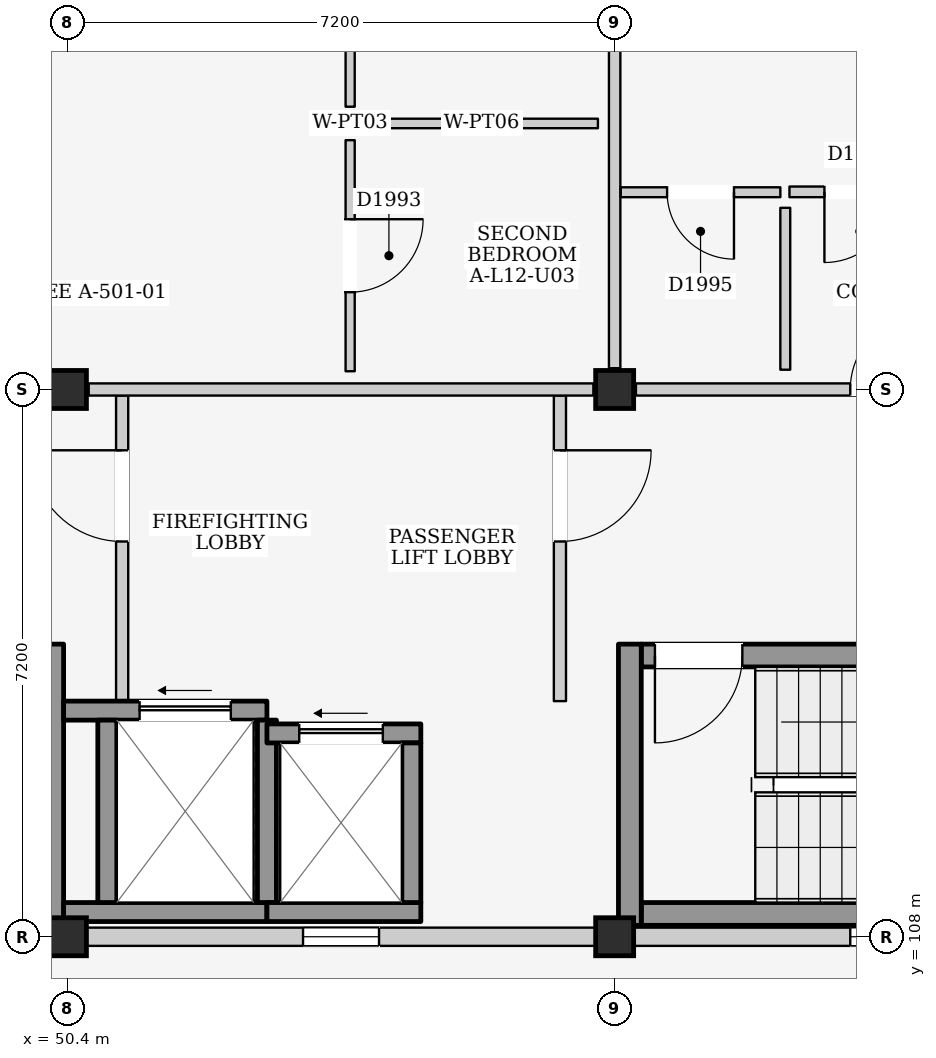
"""IFC4 building model, lengths in metres.
Left out: names, types, materials, properties, quantities, classifications, styles, units other than length and angle.
Written with IfcOpenShell. Run it as: python <this file> out.ifc"""

import sys

from ifc_helpers import new_model, si_unit, direction, frame, frame_2d, origin, origin_2d, place, context, subcontext, project, spatial, rectangle, extrude, element, fill, save


model = new_model("IFC4")
c1 = context("Model", 3, precision=1e-05, world=origin(), true_north=direction((0.0, 1.0)))
c2 = subcontext(c1, "Body", "Model", "MODEL_VIEW")
j1 = project(units=[si_unit("LENGTHUNIT", "METRE"), si_unit("PLANEANGLEUNIT", "RADIAN")], contexts=[c1])
p1 = place(None, origin())
s1 = spatial("IfcSite", under=j1, at=p1, CompositionType="ELEMENT")
p2 = place(p1, origin())
s2 = spatial("IfcBuilding", under=s1, at=p2, CompositionType="ELEMENT")
p3 = place(p2, frame((0.0, 0.0, 41.2)))
s3 = spatial("IfcBuildingStorey", under=s2, at=p3, CompositionType="ELEMENT", Elevation=41.2)
for number, where, z_axis, x_axis in (
    (1, (50.4, 108.0, 0.0), (0.0, 0.0, 1.0), (1.0, 0.0, 0.0)),
    (2, (50.4, 115.2, 0.0), (0.0, 0.0, 1.0), (1.0, 0.0, 0.0)),
    (3, (57.6, 108.0, 0.0), (0.0, 0.0, 1.0), (1.0, 0.0, 0.0)),
    (4, (57.6, 115.2, 0.0), (0.0, 0.0, 1.0), (1.0, 0.0, 0.0)),
):
    element("IfcColumn", number, at=place(p3, frame(where, z_axis=z_axis, x_axis=x_axis)), inside=s3, PredefinedType="COLUMN", context=c2, shape_type="SweptSolid", body=[
        extrude(rectangle(XDim=0.5, YDim=0.5, at=origin_2d()), origin(), (0.0, 0.0, 1.0), 3.2),
    ])
p4 = place(p3, frame((50.65, 108.0, 0.0), z_axis=(0.0, 0.0, 1.0), x_axis=(1.0, 0.0, 0.0)))
e5 = element("IfcWall", 5, at=p4, inside=s3, PredefinedType="ELEMENTEDWALL", context=c2, shape_type="SweptSolid", body=[
    extrude(rectangle(XDim=6.7, YDim=0.24, at=frame_2d((3.35, 0.0))), origin(), (0.0, 0.0, 1.0), 2.285),
])
p5 = place(p4, frame((2.85, 0.0, 1.2)))
e6 = element("IfcOpeningElement", 6, at=p5, cuts=e5, PredefinedType="OPENING", context=c2, shape_type="SweptSolid", body=[
    extrude(rectangle(XDim=1.0, YDim=0.9, at=frame_2d((0.5, 0.45))), frame((0.0, 0.135, 0.0), z_axis=(0.0, -1.0, 0.0), x_axis=(1.0, 0.0, 0.0)), (0.0, 0.0, 1.0), 0.27),
])
p6 = place(p3, frame((57.85, 108.0, 0.0), z_axis=(0.0, 0.0, 1.0), x_axis=(1.0, 0.0, 0.0)))
e7 = element("IfcWall", 7, at=p6, inside=s3, PredefinedType="ELEMENTEDWALL", context=c2, shape_type="SweptSolid", body=[
    extrude(rectangle(XDim=6.7, YDim=0.24, at=frame_2d((3.35, 0.0))), origin(), (0.0, 0.0, 1.0), 2.285),
])
p7 = place(p6, frame((2.85, 0.0, 1.2)))
e8 = element("IfcOpeningElement", 8, at=p7, cuts=e7, PredefinedType="OPENING", context=c2, shape_type="SweptSolid", body=[
    extrude(rectangle(XDim=1.0, YDim=0.9, at=frame_2d((0.5, 0.45))), frame((0.0, 0.135, 0.0), z_axis=(0.0, -1.0, 0.0), x_axis=(1.0, 0.0, 0.0)), (0.0, 0.0, 1.0), 0.27),
])
p8 = place(p3, frame((50.2, 108.15, 0.0), z_axis=(0.0, 0.0, 1.0), x_axis=(0.0, 1.0, 0.0)))
e9 = element("IfcWall", 9, at=p8, inside=s3, PredefinedType="SHEAR", context=c2, shape_type="SweptSolid", body=[
    extrude(rectangle(XDim=3.7, YDim=0.3, at=frame_2d((1.85, 0.0))), origin(), (0.0, 0.0, 1.0), 2.95),
])
p9 = place(p3, frame((51.12, 111.1, 0.0), z_axis=(0.0, 0.0, 1.0), x_axis=(0.0, 1.0, 0.0)))
e10 = element("IfcWall", 10, at=p9, inside=s3, PredefinedType="PARTITIONING", context=c2, shape_type="SweptSolid", body=[
    extrude(rectangle(XDim=4.02, YDim=0.16, at=frame_2d((2.01, 0.0))), origin(), (0.0, 0.0, 1.0), 2.95),
])
p10 = place(p9, frame((2.1, 0.0, 0.0)))
e11 = element("IfcOpeningElement", 11, at=p10, cuts=e10, PredefinedType="OPENING", context=c2, shape_type="SweptSolid", body=[
    extrude(rectangle(XDim=1.2, YDim=2.2, at=frame_2d((0.6, 1.1))), frame((0.0, 0.095, 0.0), z_axis=(0.0, -1.0, 0.0), x_axis=(1.0, 0.0, 0.0)), (0.0, 0.0, 1.0), 0.19),
])
p11 = place(p3, frame((56.88, 111.1, 0.0), z_axis=(0.0, 0.0, 1.0), x_axis=(0.0, 1.0, 0.0)))
e12 = element("IfcWall", 12, at=p11, inside=s3, PredefinedType="PARTITIONING", context=c2, shape_type="SweptSolid", body=[
    extrude(rectangle(XDim=4.02, YDim=0.16, at=frame_2d((2.01, 0.0))), origin(), (0.0, 0.0, 1.0), 2.95),
])
p12 = place(p11, frame((2.1, 0.0, 0.0)))
e13 = element("IfcOpeningElement", 13, at=p12, cuts=e12, PredefinedType="OPENING", context=c2, shape_type="SweptSolid", body=[
    extrude(rectangle(XDim=1.2, YDim=2.2, at=frame_2d((0.6, 1.1))), frame((0.0, 0.095, 0.0), z_axis=(0.0, -1.0, 0.0), x_axis=(1.0, 0.0, 0.0)), (0.0, 0.0, 1.0), 0.19),
])
p13 = place(p3, frame((50.35, 108.325, 0.0), z_axis=(0.0, 0.0, 1.0), x_axis=(1.0, 0.0, 0.0)))
e14 = element("IfcWall", 14, at=p13, inside=s3, PredefinedType="SHEAR", context=c2, shape_type="SweptSolid", body=[
    extrude(rectangle(XDim=2.675, YDim=0.25, at=frame_2d((1.337, 0.0))), origin(), (0.0, 0.0, 1.0), 2.95),
])
p14 = place(p3, frame((50.35, 110.975, 0.0), z_axis=(0.0, 0.0, 1.0), x_axis=(1.0, 0.0, 0.0)))
e15 = element("IfcWall", 15, at=p14, inside=s3, PredefinedType="SHEAR", context=c2, shape_type="SweptSolid", body=[
    extrude(rectangle(XDim=2.675, YDim=0.25, at=frame_2d((1.337, 0.0))), origin(), (0.0, 0.0, 1.0), 2.95),
])
p15 = place(p14, frame((1.0, 0.0, 0.0)))
e16 = element("IfcOpeningElement", 16, at=p15, cuts=e15, PredefinedType="OPENING", context=c2, shape_type="SweptSolid", body=[
    extrude(rectangle(XDim=1.2, YDim=2.25, at=frame_2d((0.6, 1.125))), frame((0.0, 0.14, 0.0), z_axis=(0.0, -1.0, 0.0), x_axis=(1.0, 0.0, 0.0)), (0.0, 0.0, 1.0), 0.28),
])
for number, where, z_axis, x_axis in (
    (17, (50.925, 108.45, 0.0), (0.0, 0.0, 1.0), (0.0, 1.0, 0.0)),
    (18, (53.025, 108.45, 0.0), (0.0, 0.0, 1.0), (0.0, 1.0, 0.0)),
):
    element("IfcWall", number, at=place(p3, frame(where, z_axis=z_axis, x_axis=x_axis)), inside=s3, PredefinedType="SHEAR", context=c2, shape_type="SweptSolid", body=[
        extrude(rectangle(XDim=2.4, YDim=0.25, at=frame_2d((1.2, 0.0))), origin(), (0.0, 0.0, 1.0), 2.95),
    ])
p16 = place(p3, frame((53.025, 108.325, 0.0), z_axis=(0.0, 0.0, 1.0), x_axis=(1.0, 0.0, 0.0)))
e19 = element("IfcWall", 19, at=p16, inside=s3, PredefinedType="SHEAR", context=c2, shape_type="SweptSolid", body=[
    extrude(rectangle(XDim=2.025, YDim=0.25, at=frame_2d((1.013, 0.0))), origin(), (0.0, 0.0, 1.0), 2.95),
])
p17 = place(p3, frame((53.025, 110.675, 0.0), z_axis=(0.0, 0.0, 1.0), x_axis=(1.0, 0.0, 0.0)))
e20 = element("IfcWall", 20, at=p17, inside=s3, PredefinedType="SHEAR", context=c2, shape_type="SweptSolid", body=[
    extrude(rectangle(XDim=2.025, YDim=0.25, at=frame_2d((1.013, 0.0))), origin(), (0.0, 0.0, 1.0), 2.95),
])
p18 = place(p17, frame((0.425, 0.0, 0.0)))
e21 = element("IfcOpeningElement", 21, at=p18, cuts=e20, PredefinedType="OPENING", context=c2, shape_type="SweptSolid", body=[
    extrude(rectangle(XDim=1.1, YDim=2.15, at=frame_2d((0.55, 1.075))), frame((0.0, 0.14, 0.0), z_axis=(0.0, -1.0, 0.0), x_axis=(1.0, 0.0, 0.0)), (0.0, 0.0, 1.0), 0.28),
])
p19 = place(p3, frame((54.925, 108.45, 0.0), z_axis=(0.0, 0.0, 1.0), x_axis=(0.0, 1.0, 0.0)))
e22 = element("IfcWall", 22, at=p19, inside=s3, PredefinedType="SHEAR", context=c2, shape_type="SweptSolid", body=[
    extrude(rectangle(XDim=2.1, YDim=0.25, at=frame_2d((1.05, 0.0))), origin(), (0.0, 0.0, 1.0), 2.95),
])
p20 = place(p3, frame((57.95, 108.3, 0.0), z_axis=(0.0, 0.0, 1.0), x_axis=(1.0, 0.0, 0.0)))
e23 = element("IfcWall", 23, at=p20, inside=s3, PredefinedType="SHEAR", context=c2, shape_type="SweptSolid", body=[
    extrude(rectangle(XDim=6.5, YDim=0.3, at=frame_2d((3.25, 0.0))), origin(), (0.0, 0.0, 1.0), 2.95),
])
p21 = place(p3, frame((57.95, 111.7, 0.0), z_axis=(0.0, 0.0, 1.0), x_axis=(1.0, 0.0, 0.0)))
e24 = element("IfcWall", 24, at=p21, inside=s3, PredefinedType="SHEAR", context=c2, shape_type="SweptSolid", body=[
    extrude(rectangle(XDim=6.5, YDim=0.3, at=frame_2d((3.25, 0.0))), origin(), (0.0, 0.0, 1.0), 2.95),
])
p22 = place(p21, frame((0.18, 0.0, 0.0)))
e25 = element("IfcOpeningElement", 25, at=p22, cuts=e24, PredefinedType="OPENING", context=c2, shape_type="SweptSolid", body=[
    extrude(rectangle(XDim=1.15, YDim=2.2, at=frame_2d((0.575, 1.1))), frame((0.0, 0.165, 0.0), z_axis=(0.0, -1.0, 0.0), x_axis=(1.0, 0.0, 0.0)), (0.0, 0.0, 1.0), 0.33),
])
p23 = place(p3, frame((57.8, 108.15, 0.0), z_axis=(0.0, 0.0, 1.0), x_axis=(0.0, 1.0, 0.0)))
e26 = element("IfcWall", 26, at=p23, inside=s3, PredefinedType="SHEAR", context=c2, shape_type="SweptSolid", body=[
    extrude(rectangle(XDim=3.7, YDim=0.3, at=frame_2d((1.85, 0.0))), origin(), (0.0, 0.0, 1.0), 2.95),
])
p24 = place(p3, frame((50.68, 115.2, 0.0), z_axis=(0.0, 0.0, 1.0), x_axis=(1.0, 0.0, 0.0)))
e27 = element("IfcWall", 27, at=p24, inside=s3, PredefinedType="PARTITIONING", context=c2, shape_type="SweptSolid", body=[
    extrude(rectangle(XDim=6.64, YDim=0.16, at=frame_2d((3.32, 0.0))), origin(), (0.0, 0.0, 1.0), 2.285),
])
p25 = place(p3, frame((57.6, 115.48, 0.0), z_axis=(0.0, 0.0, 1.0), x_axis=(0.0, 1.0, 0.0)))
e28 = element("IfcWall", 28, at=p25, inside=s3, PredefinedType="PARTITIONING", context=c2, shape_type="SweptSolid", body=[
    extrude(rectangle(XDim=6.64, YDim=0.15, at=frame_2d((3.32, 0.0))), origin(), (0.0, 0.0, 1.0), 2.435),
])
p26 = place(p3, frame((54.12, 118.92, 0.0), z_axis=(0.0, 0.0, 1.0), x_axis=(0.0, 1.0, 0.0)))
e29 = element("IfcWall", 29, at=p26, inside=s3, PredefinedType="PARTITIONING", context=c2, shape_type="SweptSolid", body=[
    extrude(rectangle(XDim=3.04, YDim=0.12, at=frame_2d((1.52, 0.0))), origin(), (0.0, 0.0, 1.0), 2.95),
])
p27 = place(p26, frame((1.045, 0.0, 0.0)))
e30 = element("IfcOpeningElement", 30, at=p27, cuts=e29, PredefinedType="OPENING", context=c2, shape_type="SweptSolid", body=[
    extrude(rectangle(XDim=0.95, YDim=2.15, at=frame_2d((0.475, 1.075))), frame((0.0, 0.075, 0.0), z_axis=(0.0, -1.0, 0.0), x_axis=(1.0, 0.0, 0.0)), (0.0, 0.0, 1.0), 0.15),
])
p28 = place(p3, frame((54.32, 118.7, 0.0), z_axis=(0.0, 0.0, 1.0), x_axis=(1.0, 0.0, 0.0)))
e31 = element("IfcWall", 31, at=p28, inside=s3, PredefinedType="PARTITIONING", context=c2, shape_type="SweptSolid", body=[
    extrude(rectangle(XDim=3.06, YDim=0.125, at=frame_2d((1.53, 0.0))), origin(), (0.0, 0.0, 1.0), 2.95),
])
p29 = place(p3, frame((54.12, 115.44, 0.0), z_axis=(0.0, 0.0, 1.0), x_axis=(0.0, 1.0, 0.0)))
e32 = element("IfcWall", 32, at=p29, inside=s3, PredefinedType="PARTITIONING", context=c2, shape_type="SweptSolid", body=[
    extrude(rectangle(XDim=3.04, YDim=0.12, at=frame_2d((1.52, 0.0))), origin(), (0.0, 0.0, 1.0), 2.95),
])
p30 = place(p29, frame((1.04, 0.0, 0.0)))
e33 = element("IfcOpeningElement", 33, at=p30, cuts=e32, PredefinedType="OPENING", context=c2, shape_type="SweptSolid", body=[
    extrude(rectangle(XDim=0.96, YDim=2.15, at=frame_2d((0.48, 1.075))), frame((0.0, 0.075, 0.0), z_axis=(0.0, -1.0, 0.0), x_axis=(1.0, 0.0, 0.0)), (0.0, 0.0, 1.0), 0.15),
])
p31 = place(p3, frame((57.88, 115.2, 0.0), z_axis=(0.0, 0.0, 1.0), x_axis=(1.0, 0.0, 0.0)))
e34 = element("IfcWall", 34, at=p31, inside=s3, PredefinedType="PARTITIONING", context=c2, shape_type="SweptSolid", body=[
    extrude(rectangle(XDim=6.64, YDim=0.16, at=frame_2d((3.32, 0.0))), origin(), (0.0, 0.0, 1.0), 2.285),
])
p32 = place(p31, frame((2.82, 0.0, 0.0)))
e35 = element("IfcOpeningElement", 35, at=p32, cuts=e34, PredefinedType="OPENING", context=c2, shape_type="SweptSolid", body=[
    extrude(rectangle(XDim=1.0, YDim=2.15, at=frame_2d((0.5, 1.075))), frame((0.0, 0.095, 0.0), z_axis=(0.0, -1.0, 0.0), x_axis=(1.0, 0.0, 0.0)), (0.0, 0.0, 1.0), 0.19),
])
p33 = place(p3, frame((57.68, 117.795, 0.0), z_axis=(0.0, 0.0, 1.0), x_axis=(1.0, 0.0, 0.0)))
e36 = element("IfcWall", 36, at=p33, inside=s3, PredefinedType="PARTITIONING", context=c2, shape_type="SweptSolid", body=[
    extrude(rectangle(XDim=2.1, YDim=0.13, at=frame_2d((1.05, 0.0))), origin(), (0.0, 0.0, 1.0), 2.95),
])
p34 = place(p33, frame((0.61, 0.0, 0.0)))
e37 = element("IfcOpeningElement", 37, at=p34, cuts=e36, PredefinedType="OPENING", context=c2, shape_type="SweptSolid", body=[
    extrude(rectangle(XDim=0.88, YDim=2.1, at=frame_2d((0.44, 1.05))), frame((0.0, 0.08, 0.0), z_axis=(0.0, -1.0, 0.0), x_axis=(1.0, 0.0, 0.0)), (0.0, 0.0, 1.0), 0.16),
])
p35 = place(p3, frame((59.845, 115.46, 0.0), z_axis=(0.0, 0.0, 1.0), x_axis=(0.0, 1.0, 0.0)))
e38 = element("IfcWall", 38, at=p35, inside=s3, PredefinedType="PARTITIONING", context=c2, shape_type="SweptSolid", body=[
    extrude(rectangle(XDim=2.13, YDim=0.13, at=frame_2d((1.065, 0.0))), origin(), (0.0, 0.0, 1.0), 2.95),
])
p36 = place(p3, frame((59.9, 117.8, 0.0), z_axis=(0.0, 0.0, 1.0), x_axis=(1.0, 0.0, 0.0)))
e39 = element("IfcWall", 39, at=p36, inside=s3, PredefinedType="PARTITIONING", context=c2, shape_type="SweptSolid", body=[
    extrude(rectangle(XDim=1.85, YDim=0.14, at=frame_2d((0.925, 0.0))), origin(), (0.0, 0.0, 1.0), 2.95),
])
p37 = place(p36, frame((0.46, 0.0, 0.0)))
e40 = element("IfcOpeningElement", 40, at=p37, cuts=e39, PredefinedType="OPENING", context=c2, shape_type="SweptSolid", body=[
    extrude(rectangle(XDim=0.93, YDim=2.14, at=frame_2d((0.465, 1.07))), frame((0.0, 0.085, 0.0), z_axis=(0.0, -1.0, 0.0), x_axis=(1.0, 0.0, 0.0)), (0.0, 0.0, 1.0), 0.17),
])
p38 = place(p5, origin())
e41 = element("IfcWindow", 41, at=p38, inside=s3, PartitioningType="SINGLE_PANEL", PredefinedType="WINDOW", context=c2, shape_type="SweptSolid", body=[
    extrude(rectangle(XDim=1.0, YDim=0.9, at=frame_2d((0.5, 0.45))), frame((0.0, 0.03, 0.0), z_axis=(0.0, -1.0, 0.0), x_axis=(1.0, 0.0, 0.0)), (0.0, 0.0, 1.0), 0.06),
])
fill(e6, e41)
p39 = place(p7, origin())
e42 = element("IfcWindow", 42, at=p39, inside=s3, PartitioningType="SINGLE_PANEL", PredefinedType="WINDOW", context=c2, shape_type="SweptSolid", body=[
    extrude(rectangle(XDim=1.0, YDim=0.9, at=frame_2d((0.5, 0.45))), frame((0.0, 0.03, 0.0), z_axis=(0.0, -1.0, 0.0), x_axis=(1.0, 0.0, 0.0)), (0.0, 0.0, 1.0), 0.06),
])
fill(e8, e42)
p40 = place(p10, origin())
e43 = element("IfcDoor", 43, at=p40, inside=s3, OperationType="SINGLE_SWING_RIGHT", PredefinedType="DOOR", context=c2, shape_type="SweptSolid", body=[
    extrude(rectangle(XDim=1.2, YDim=2.2, at=frame_2d((0.6, 1.1))), frame((0.0, 0.025, 0.0), z_axis=(0.0, -1.0, 0.0), x_axis=(1.0, 0.0, 0.0)), (0.0, 0.0, 1.0), 0.05),
])
fill(e11, e43)
p41 = place(p12, frame((1.2, 0.0, 0.0), z_axis=(0.0, 0.0, 1.0), x_axis=(-1.0, 0.0, 0.0)))
e44 = element("IfcDoor", 44, at=p41, inside=s3, OperationType="SINGLE_SWING_LEFT", PredefinedType="DOOR", context=c2, shape_type="SweptSolid", body=[
    extrude(rectangle(XDim=1.2, YDim=2.2, at=frame_2d((0.6, 1.1))), frame((0.0, 0.025, 0.0), z_axis=(0.0, -1.0, 0.0), x_axis=(1.0, 0.0, 0.0)), (0.0, 0.0, 1.0), 0.05),
])
fill(e13, e44)
p42 = place(p15, origin())
e45 = element("IfcDoor", 45, at=p42, inside=s3, OperationType="SLIDING_TO_LEFT", PredefinedType="DOOR", context=c2, shape_type="SweptSolid", body=[
    extrude(rectangle(XDim=1.2, YDim=2.25, at=frame_2d((0.6, 1.125))), frame((0.0, 0.025, 0.0), z_axis=(0.0, -1.0, 0.0), x_axis=(1.0, 0.0, 0.0)), (0.0, 0.0, 1.0), 0.05),
])
fill(e16, e45)
p43 = place(p18, origin())
e46 = element("IfcDoor", 46, at=p43, inside=s3, OperationType="SLIDING_TO_LEFT", PredefinedType="DOOR", context=c2, shape_type="SweptSolid", body=[
    extrude(rectangle(XDim=1.1, YDim=2.15, at=frame_2d((0.55, 1.075))), frame((0.0, 0.025, 0.0), z_axis=(0.0, -1.0, 0.0), x_axis=(1.0, 0.0, 0.0)), (0.0, 0.0, 1.0), 0.05),
])
fill(e21, e46)
p44 = place(p22, frame((1.15, 0.0, 0.0), z_axis=(0.0, 0.0, 1.0), x_axis=(-1.0, 0.0, 0.0)))
e47 = element("IfcDoor", 47, at=p44, inside=s3, OperationType="SINGLE_SWING_RIGHT", PredefinedType="DOOR", context=c2, shape_type="SweptSolid", body=[
    extrude(rectangle(XDim=1.15, YDim=2.2, at=frame_2d((0.575, 1.1))), frame((0.0, 0.025, 0.0), z_axis=(0.0, -1.0, 0.0), x_axis=(1.0, 0.0, 0.0)), (0.0, 0.0, 1.0), 0.05),
])
fill(e25, e47)
p45 = place(p30, frame((0.96, 0.0, 0.0), z_axis=(0.0, 0.0, 1.0), x_axis=(-1.0, 0.0, 0.0)))
e48 = element("IfcDoor", 48, at=p45, inside=s3, OperationType="SINGLE_SWING_LEFT", PredefinedType="DOOR", context=c2, shape_type="SweptSolid", body=[
    extrude(rectangle(XDim=0.96, YDim=2.15, at=frame_2d((0.48, 1.075))), frame((0.0, 0.025, 0.0), z_axis=(0.0, -1.0, 0.0), x_axis=(1.0, 0.0, 0.0)), (0.0, 0.0, 1.0), 0.05),
])
fill(e33, e48)
p46 = place(p32, origin())
e49 = element("IfcDoor", 49, at=p46, inside=s3, OperationType="SINGLE_SWING_RIGHT", PredefinedType="DOOR", context=c2, shape_type="SweptSolid", body=[
    extrude(rectangle(XDim=1.0, YDim=2.15, at=frame_2d((0.5, 1.075))), frame((0.0, 0.025, 0.0), z_axis=(0.0, -1.0, 0.0), x_axis=(1.0, 0.0, 0.0)), (0.0, 0.0, 1.0), 0.05),
])
fill(e35, e49)
p47 = place(p34, frame((0.88, 0.0, 0.0), z_axis=(0.0, 0.0, 1.0), x_axis=(-1.0, 0.0, 0.0)))
e50 = element("IfcDoor", 50, at=p47, inside=s3, OperationType="SINGLE_SWING_LEFT", PredefinedType="DOOR", context=c2, shape_type="SweptSolid", body=[
    extrude(rectangle(XDim=0.88, YDim=2.1, at=frame_2d((0.44, 1.05))), frame((0.0, 0.025, 0.0), z_axis=(0.0, -1.0, 0.0), x_axis=(1.0, 0.0, 0.0)), (0.0, 0.0, 1.0), 0.05),
])
fill(e37, e50)
p48 = place(p37, frame((0.93, 0.0, 0.0), z_axis=(0.0, 0.0, 1.0), x_axis=(-1.0, 0.0, 0.0)))
e51 = element("IfcDoor", 51, at=p48, inside=s3, OperationType="SINGLE_SWING_RIGHT", PredefinedType="DOOR", context=c2, shape_type="SweptSolid", body=[
    extrude(rectangle(XDim=0.93, YDim=2.14, at=frame_2d((0.465, 1.07))), frame((0.0, 0.025, 0.0), z_axis=(0.0, -1.0, 0.0), x_axis=(1.0, 0.0, 0.0)), (0.0, 0.0, 1.0), 0.05),
])
fill(e40, e51)
save(model, sys.argv[1])
